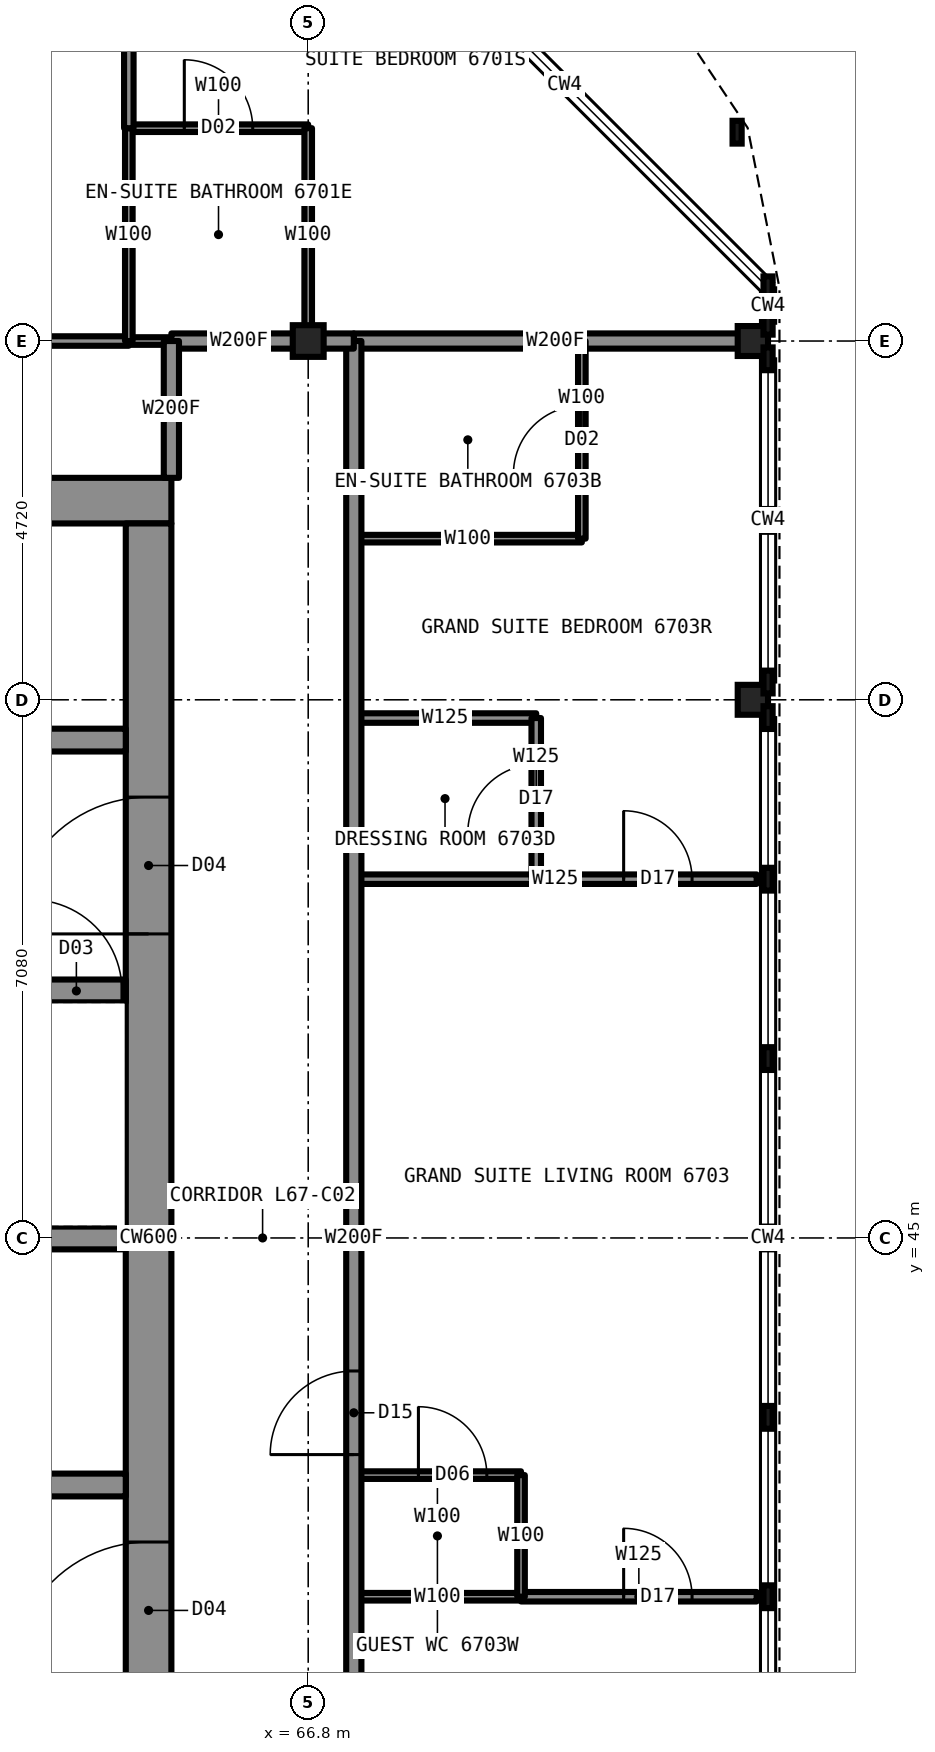
"""IFC4 building model, lengths in metres.
Left out: names, types, materials, properties, quantities, classifications, styles, units other than length and angle.
Written with IfcOpenShell. Run it as: python <this file> out.ifc"""

import sys

from ifc_helpers import new_model, si_unit, direction, frame, frame_2d, origin, origin_2d, place, context, subcontext, project, spatial, rectangle, i_section, extrude, element, fill, save


model = new_model("IFC4")
c1 = context("Model", 3, precision=1e-05, world=origin(), true_north=direction((0.0, 1.0)))
c2 = subcontext(c1, "Body", "Model", "MODEL_VIEW")
j1 = project(units=[si_unit("LENGTHUNIT", "METRE"), si_unit("PLANEANGLEUNIT", "RADIAN")], contexts=[c1])
p1 = place(None, origin())
s1 = spatial("IfcSite", under=j1, at=p1, CompositionType="ELEMENT")
p2 = place(p1, origin())
s2 = spatial("IfcBuilding", under=s1, at=p2, CompositionType="ELEMENT")
p3 = place(p2, frame((0.0, 0.0, 247.7)))
s3 = spatial("IfcBuildingStorey", under=s2, at=p3, CompositionType="ELEMENT", Elevation=247.7)
for number, where, z_axis, x_axis in (
    (1, (72.65, 52.08, 0.0), (0.0, 0.0, 1.0), (1.0, 0.0, 0.0)),
    (2, (72.65, 56.8, 0.0), (0.0, 0.0, 1.0), (1.0, 0.0, 0.0)),
):
    element("IfcColumn", number, at=place(p3, frame(where, z_axis=z_axis, x_axis=x_axis)), inside=s3, PredefinedType="COLUMN", context=c2, shape_type="SweptSolid", body=[
        extrude(i_section(OverallWidth=0.399, OverallDepth=0.394, WebThickness=0.023, FlangeThickness=0.037, at=origin_2d()), origin(), (0.0, 0.0, 1.0), 3.5),
    ])
p4 = place(p3, frame((66.8, 56.8, 0.0), z_axis=(0.0, 0.0, 1.0), x_axis=(1.0, 0.0, 0.0)))
e3 = element("IfcColumn", 3, at=p4, inside=s3, PredefinedType="COLUMN", context=c2, shape_type="SweptSolid", body=[
    extrude(i_section(OverallWidth=0.406, OverallDepth=0.417, WebThickness=0.03, FlangeThickness=0.048, at=origin_2d()), origin(), (0.0, 0.0, 1.0), 3.5),
])
p5 = place(p3, frame((45.0, 54.7, 0.0), z_axis=(0.0, 0.0, 1.0), x_axis=(1.0, 0.0, 0.0)))
e4 = element("IfcWall", 4, at=p5, inside=s3, PredefinedType="SHEAR", context=c2, shape_type="SweptSolid", body=[
    extrude(rectangle(XDim=20.0, YDim=0.6, at=frame_2d((10.0, 0.0))), origin(), (0.0, 0.0, 1.0), 3.5),
])
p6 = place(p3, frame((64.7, 35.6, 0.0), z_axis=(0.0, 0.0, 1.0), x_axis=(0.0, 1.0, 0.0)))
e5 = element("IfcWall", 5, at=p6, inside=s3, PredefinedType="SHEAR", context=c2, shape_type="SweptSolid", body=[
    extrude(rectangle(XDim=18.8, YDim=0.6, at=frame_2d((9.4, 0.0))), origin(), (0.0, 0.0, 1.0), 3.5),
])
p7 = place(p6, frame((13.4, 0.0, 0.0)))
e6 = element("IfcOpeningElement", 6, at=p7, cuts=e5, PredefinedType="OPENING", context=c2, shape_type="SweptSolid", body=[
    extrude(rectangle(XDim=1.8, YDim=2.2, at=frame_2d((0.9, 1.1))), frame((0.0, 0.31, 0.0), z_axis=(0.0, -1.0, 0.0), x_axis=(1.0, 0.0, 0.0)), (0.0, 0.0, 1.0), 0.62),
])
p8 = place(p6, frame((3.6, 0.0, 0.0)))
e7 = element("IfcOpeningElement", 7, at=p8, cuts=e5, PredefinedType="OPENING", context=c2, shape_type="SweptSolid", body=[
    extrude(rectangle(XDim=1.8, YDim=2.2, at=frame_2d((0.9, 1.1))), frame((0.0, 0.31, 0.0), z_axis=(0.0, -1.0, 0.0), x_axis=(1.0, 0.0, 0.0)), (0.0, 0.0, 1.0), 0.62),
])
p9 = place(p3, frame((45.6, 51.55, 0.0), z_axis=(0.0, 0.0, 1.0), x_axis=(1.0, 0.0, 0.0)))
e8 = element("IfcWall", 8, at=p9, inside=s3, PredefinedType="SHEAR", context=c2, shape_type="SweptSolid", body=[
    extrude(rectangle(XDim=18.8, YDim=0.3, at=frame_2d((9.4, 0.0))), origin(), (0.0, 0.0, 1.0), 3.5),
])
p10 = place(p9, frame((4.8, 0.0, 0.0)))
e9 = element("IfcOpeningElement", 9, at=p10, cuts=e8, PredefinedType="OPENING", context=c2, shape_type="SweptSolid", body=[
    extrude(rectangle(XDim=1.0, YDim=2.1, at=frame_2d((0.5, 1.05))), frame((0.0, 0.16, 0.0), z_axis=(0.0, -1.0, 0.0), x_axis=(1.0, 0.0, 0.0)), (0.0, 0.0, 1.0), 0.32),
])
p11 = place(p9, frame((11.6, 0.0, 0.0)))
e10 = element("IfcOpeningElement", 10, at=p11, cuts=e8, PredefinedType="OPENING", context=c2, shape_type="SweptSolid", body=[
    extrude(rectangle(XDim=1.1, YDim=2.2, at=frame_2d((0.55, 1.1))), frame((0.0, 0.16, 0.0), z_axis=(0.0, -1.0, 0.0), x_axis=(1.0, 0.0, 0.0)), (0.0, 0.0, 1.0), 0.32),
])
p12 = place(p9, frame((14.3, 0.0, 0.0)))
e11 = element("IfcOpeningElement", 11, at=p12, cuts=e8, PredefinedType="OPENING", context=c2, shape_type="SweptSolid", body=[
    extrude(rectangle(XDim=1.1, YDim=2.2, at=frame_2d((0.55, 1.1))), frame((0.0, 0.16, 0.0), z_axis=(0.0, -1.0, 0.0), x_axis=(1.0, 0.0, 0.0)), (0.0, 0.0, 1.0), 0.32),
])
p13 = place(p3, frame((56.2, 48.25, 0.0), z_axis=(0.0, 0.0, 1.0), x_axis=(1.0, 0.0, 0.0)))
e12 = element("IfcWall", 12, at=p13, inside=s3, PredefinedType="SHEAR", context=c2, shape_type="SweptSolid", body=[
    extrude(rectangle(XDim=8.2, YDim=0.3, at=frame_2d((4.1, 0.0))), origin(), (0.0, 0.0, 1.0), 3.5),
])
p14 = place(p13, frame((6.95, 0.0, 0.0)))
e13 = element("IfcOpeningElement", 13, at=p14, cuts=e12, PredefinedType="OPENING", context=c2, shape_type="SweptSolid", body=[
    extrude(rectangle(XDim=1.2, YDim=2.2, at=frame_2d((0.6, 1.1))), frame((0.0, 0.16, 0.0), z_axis=(0.0, -1.0, 0.0), x_axis=(1.0, 0.0, 0.0)), (0.0, 0.0, 1.0), 0.32),
])
p15 = place(p3, frame((56.2, 41.75, 0.0), z_axis=(0.0, 0.0, 1.0), x_axis=(1.0, 0.0, 0.0)))
e14 = element("IfcWall", 14, at=p15, inside=s3, PredefinedType="SHEAR", context=c2, shape_type="SweptSolid", body=[
    extrude(rectangle(XDim=8.2, YDim=0.3, at=frame_2d((4.1, 0.0))), origin(), (0.0, 0.0, 1.0), 3.5),
])
p16 = place(p15, frame((3.3, 0.0, 0.0)))
e15 = element("IfcOpeningElement", 15, at=p16, cuts=e14, PredefinedType="OPENING", context=c2, shape_type="SweptSolid", body=[
    extrude(rectangle(XDim=1.0, YDim=2.1, at=frame_2d((0.5, 1.05))), frame((0.0, 0.16, 0.0), z_axis=(0.0, -1.0, 0.0), x_axis=(1.0, 0.0, 0.0)), (0.0, 0.0, 1.0), 0.32),
])
p17 = place(p3, frame((56.5, 45.0, 0.0), z_axis=(0.0, 0.0, 1.0), x_axis=(1.0, 0.0, 0.0)))
e16 = element("IfcWall", 16, at=p17, inside=s3, PredefinedType="SHEAR", context=c2, shape_type="SweptSolid", body=[
    extrude(rectangle(XDim=7.9, YDim=0.3, at=frame_2d((3.95, 0.0))), origin(), (0.0, 0.0, 1.0), 3.5),
])
p18 = place(p3, frame((67.4, 41.88, 0.0), z_axis=(0.0, 0.0, 1.0), x_axis=(1.0, 0.0, 0.0)))
e17 = element("IfcWall", 17, at=p18, inside=s3, PredefinedType="PARTITIONING", context=c2, shape_type="SweptSolid", body=[
    extrude(rectangle(XDim=2.2, YDim=0.1, at=frame_2d((1.1, 0.0))), origin(), (0.0, 0.0, 1.0), 3.33),
])
p19 = place(p18, frame((0.85, 0.0, 0.0)))
e18 = element("IfcOpeningElement", 18, at=p19, cuts=e17, PredefinedType="OPENING", context=c2, shape_type="SweptSolid", body=[
    extrude(rectangle(XDim=0.9, YDim=2.1, at=frame_2d((0.45, 1.05))), frame((0.0, 0.06, 0.0), z_axis=(0.0, -1.0, 0.0), x_axis=(1.0, 0.0, 0.0)), (0.0, 0.0, 1.0), 0.12),
])
p20 = place(p3, frame((67.4, 40.28, 0.0), z_axis=(0.0, 0.0, 1.0), x_axis=(1.0, 0.0, 0.0)))
e19 = element("IfcWall", 19, at=p20, inside=s3, PredefinedType="PARTITIONING", context=c2, shape_type="SweptSolid", body=[
    extrude(rectangle(XDim=2.2, YDim=0.1, at=frame_2d((1.1, 0.0))), origin(), (0.0, 0.0, 1.0), 2.797),
])
p21 = place(p3, frame((69.6, 40.28, 0.0), z_axis=(0.0, 0.0, 1.0), x_axis=(1.0, 0.0, 0.0)))
e20 = element("IfcWall", 20, at=p21, inside=s3, PredefinedType="PARTITIONING", context=c2, shape_type="SweptSolid", body=[
    extrude(rectangle(XDim=3.1, YDim=0.125, at=frame_2d((1.55, 0.0))), origin(), (0.0, 0.0, 1.0), 2.797),
])
p22 = place(p21, frame((1.35, 0.0, 0.0)))
e21 = element("IfcOpeningElement", 21, at=p22, cuts=e20, PredefinedType="OPENING", context=c2, shape_type="SweptSolid", body=[
    extrude(rectangle(XDim=0.9, YDim=2.2, at=frame_2d((0.45, 1.1))), frame((0.0, 0.073, 0.0), z_axis=(0.0, -1.0, 0.0), x_axis=(1.0, 0.0, 0.0)), (0.0, 0.0, 1.0), 0.145),
])
p23 = place(p3, frame((64.44, 56.8, 0.0), z_axis=(0.0, 0.0, 1.0), x_axis=(1.0, 0.0, 0.0)))
e22 = element("IfcWall", 22, at=p23, inside=s3, PredefinedType="PARTITIONING", context=c2, shape_type="SweptSolid", body=[
    extrude(rectangle(XDim=0.56, YDim=0.1, at=frame_2d((0.28, 0.0))), origin(), (0.0, 0.0, 1.0), 3.33),
])
p24 = place(p3, frame((65.0, 56.8, 0.0), z_axis=(0.0, 0.0, 1.0), x_axis=(1.0, 0.0, 0.0)))
e23 = element("IfcWall", 23, at=p24, inside=s3, PredefinedType="PARTITIONING", context=c2, shape_type="SweptSolid", body=[
    extrude(rectangle(XDim=1.78, YDim=0.2, at=frame_2d((0.89, 0.0))), origin(), (0.0, 0.0, 1.0), 3.33),
])
p25 = place(p3, frame((67.4, 56.8, 0.0), z_axis=(0.0, 0.0, 1.0), x_axis=(1.0, 0.0, 0.0)))
e24 = element("IfcWall", 24, at=p25, inside=s3, PredefinedType="PARTITIONING", context=c2, shape_type="SweptSolid", body=[
    extrude(rectangle(XDim=5.3, YDim=0.2, at=frame_2d((2.65, 0.0))), origin(), (0.0, 0.0, 1.0), 2.573),
])
p26 = place(p3, frame((57.36, 56.8, 0.0), z_axis=(0.0, 0.0, 1.0), x_axis=(1.0, 0.0, 0.0)))
e25 = element("IfcWall", 25, at=p26, inside=s3, PredefinedType="PARTITIONING", context=c2, shape_type="SweptSolid", body=[
    extrude(rectangle(XDim=7.08, YDim=0.125, at=frame_2d((3.54, 0.0))), origin(), (0.0, 0.0, 1.0), 3.33),
])
p27 = place(p3, frame((64.44, 59.6, 0.0), z_axis=(0.0, 0.0, 1.0), x_axis=(1.0, 0.0, 0.0)))
e26 = element("IfcWall", 26, at=p27, inside=s3, PredefinedType="PARTITIONING", context=c2, shape_type="SweptSolid", body=[
    extrude(rectangle(XDim=2.36, YDim=0.1, at=frame_2d((1.18, 0.0))), origin(), (0.0, 0.0, 1.0), 3.33),
])
p28 = place(p27, frame((0.73, 0.0, 0.0)))
e27 = element("IfcOpeningElement", 27, at=p28, cuts=e26, PredefinedType="OPENING", context=c2, shape_type="SweptSolid", body=[
    extrude(rectangle(XDim=0.9, YDim=2.1, at=frame_2d((0.45, 1.05))), frame((0.0, 0.06, 0.0), z_axis=(0.0, -1.0, 0.0), x_axis=(1.0, 0.0, 0.0)), (0.0, 0.0, 1.0), 0.12),
])
p29 = place(p3, frame((67.4, 49.72, 0.0), z_axis=(0.0, 0.0, 1.0), x_axis=(1.0, 0.0, 0.0)))
e28 = element("IfcWall", 28, at=p29, inside=s3, PredefinedType="PARTITIONING", context=c2, shape_type="SweptSolid", body=[
    extrude(rectangle(XDim=5.3, YDim=0.125, at=frame_2d((2.65, 0.0))), origin(), (0.0, 0.0, 1.0), 2.797),
])
p30 = place(p29, frame((3.55, 0.0, 0.0)))
e29 = element("IfcOpeningElement", 29, at=p30, cuts=e28, PredefinedType="OPENING", context=c2, shape_type="SweptSolid", body=[
    extrude(rectangle(XDim=0.9, YDim=2.2, at=frame_2d((0.45, 1.1))), frame((0.0, 0.073, 0.0), z_axis=(0.0, -1.0, 0.0), x_axis=(1.0, 0.0, 0.0)), (0.0, 0.0, 1.0), 0.145),
])
p31 = place(p3, frame((67.4, 51.84, 0.0), z_axis=(0.0, 0.0, 1.0), x_axis=(1.0, 0.0, 0.0)))
e30 = element("IfcWall", 30, at=p31, inside=s3, PredefinedType="PARTITIONING", context=c2, shape_type="SweptSolid", body=[
    extrude(rectangle(XDim=2.4, YDim=0.125, at=frame_2d((1.2, 0.0))), origin(), (0.0, 0.0, 1.0), 3.33),
])
p32 = place(p3, frame((67.4, 54.2, 0.0), z_axis=(0.0, 0.0, 1.0), x_axis=(1.0, 0.0, 0.0)))
e31 = element("IfcWall", 31, at=p32, inside=s3, PredefinedType="PARTITIONING", context=c2, shape_type="SweptSolid", body=[
    extrude(rectangle(XDim=3.0, YDim=0.1, at=frame_2d((1.5, 0.0))), origin(), (0.0, 0.0, 1.0), 3.33),
])
p33 = place(p3, frame((65.0, 55.0, 0.0), z_axis=(0.0, 0.0, 1.0), x_axis=(0.0, 1.0, 0.0)))
e32 = element("IfcWall", 32, at=p33, inside=s3, PredefinedType="PARTITIONING", context=c2, shape_type="SweptSolid", body=[
    extrude(rectangle(XDim=1.8, YDim=0.2, at=frame_2d((0.9, 0.0))), origin(), (0.0, 0.0, 1.0), 3.33),
])
p34 = place(p3, frame((66.8, 56.8, 0.0), z_axis=(0.0, 0.0, 1.0), x_axis=(0.0, 1.0, 0.0)))
e33 = element("IfcWall", 33, at=p34, inside=s3, PredefinedType="PARTITIONING", context=c2, shape_type="SweptSolid", body=[
    extrude(rectangle(XDim=2.8, YDim=0.1, at=frame_2d((1.4, 0.0))), origin(), (0.0, 0.0, 1.0), 2.573),
])
p35 = place(p3, frame((67.4, 33.2, 0.0), z_axis=(0.0, 0.0, 1.0), x_axis=(0.0, 1.0, 0.0)))
e34 = element("IfcWall", 34, at=p35, inside=s3, PredefinedType="PARTITIONING", context=c2, shape_type="SweptSolid", body=[
    extrude(rectangle(XDim=23.6, YDim=0.2, at=frame_2d((11.8, 0.0))), origin(), (0.0, 0.0, 1.0), 3.33),
])
p36 = place(p35, frame((8.95, 0.0, 0.0)))
e35 = element("IfcOpeningElement", 35, at=p36, cuts=e34, PredefinedType="OPENING", context=c2, shape_type="SweptSolid", body=[
    extrude(rectangle(XDim=1.1, YDim=2.2, at=frame_2d((0.55, 1.1))), frame((0.0, 0.11, 0.0), z_axis=(0.0, -1.0, 0.0), x_axis=(1.0, 0.0, 0.0)), (0.0, 0.0, 1.0), 0.22),
])
p37 = place(p35, frame((0.7, 0.0, 0.0)))
e36 = element("IfcOpeningElement", 36, at=p37, cuts=e34, PredefinedType="OPENING", context=c2, shape_type="SweptSolid", body=[
    extrude(rectangle(XDim=1.0, YDim=2.1, at=frame_2d((0.5, 1.05))), frame((0.0, 0.11, 0.0), z_axis=(0.0, -1.0, 0.0), x_axis=(1.0, 0.0, 0.0)), (0.0, 0.0, 1.0), 0.22),
])
p38 = place(p3, frame((69.6, 40.28, 0.0), z_axis=(0.0, 0.0, 1.0), x_axis=(0.0, 1.0, 0.0)))
e37 = element("IfcWall", 37, at=p38, inside=s3, PredefinedType="PARTITIONING", context=c2, shape_type="SweptSolid", body=[
    extrude(rectangle(XDim=1.6, YDim=0.1, at=frame_2d((0.8, 0.0))), origin(), (0.0, 0.0, 1.0), 3.33),
])
p39 = place(p3, frame((69.8, 49.72, 0.0), z_axis=(0.0, 0.0, 1.0), x_axis=(0.0, 1.0, 0.0)))
e38 = element("IfcWall", 38, at=p39, inside=s3, PredefinedType="PARTITIONING", context=c2, shape_type="SweptSolid", body=[
    extrude(rectangle(XDim=2.12, YDim=0.125, at=frame_2d((1.06, 0.0))), origin(), (0.0, 0.0, 1.0), 3.33),
])
p40 = place(p39, frame((0.61, 0.0, 0.0)))
e39 = element("IfcOpeningElement", 39, at=p40, cuts=e38, PredefinedType="OPENING", context=c2, shape_type="SweptSolid", body=[
    extrude(rectangle(XDim=0.9, YDim=2.2, at=frame_2d((0.45, 1.1))), frame((0.0, 0.073, 0.0), z_axis=(0.0, -1.0, 0.0), x_axis=(1.0, 0.0, 0.0)), (0.0, 0.0, 1.0), 0.145),
])
p41 = place(p3, frame((70.4, 54.2, 0.0), z_axis=(0.0, 0.0, 1.0), x_axis=(0.0, 1.0, 0.0)))
e40 = element("IfcWall", 40, at=p41, inside=s3, PredefinedType="PARTITIONING", context=c2, shape_type="SweptSolid", body=[
    extrude(rectangle(XDim=2.6, YDim=0.1, at=frame_2d((1.3, 0.0))), origin(), (0.0, 0.0, 1.0), 3.33),
])
p42 = place(p41, frame((0.85, 0.0, 0.0)))
e41 = element("IfcOpeningElement", 41, at=p42, cuts=e40, PredefinedType="OPENING", context=c2, shape_type="SweptSolid", body=[
    extrude(rectangle(XDim=0.9, YDim=2.1, at=frame_2d((0.45, 1.05))), frame((0.0, 0.06, 0.0), z_axis=(0.0, -1.0, 0.0), x_axis=(1.0, 0.0, 0.0)), (0.0, 0.0, 1.0), 0.12),
])
p43 = place(p3, frame((64.44, 56.8, 0.0), z_axis=(0.0, 0.0, 1.0), x_axis=(0.0, 1.0, 0.0)))
e42 = element("IfcWall", 42, at=p43, inside=s3, PredefinedType="PARTITIONING", context=c2, shape_type="SweptSolid", body=[
    extrude(rectangle(XDim=2.8, YDim=0.1, at=frame_2d((1.4, 0.0))), origin(), (0.0, 0.0, 1.0), 3.33),
])
p44 = place(p3, frame((64.44, 59.6, 0.0), z_axis=(0.0, 0.0, 1.0), x_axis=(0.0, 1.0, 0.0)))
e43 = element("IfcWall", 43, at=p44, inside=s3, PredefinedType="PARTITIONING", context=c2, shape_type="SweptSolid", body=[
    extrude(rectangle(XDim=3.1, YDim=0.125, at=frame_2d((1.55, 0.0))), origin(), (0.0, 0.0, 1.0), 3.33),
])
p45 = place(p44, frame((1.25, 0.0, 0.0)))
e44 = element("IfcOpeningElement", 44, at=p45, cuts=e43, PredefinedType="OPENING", context=c2, shape_type="SweptSolid", body=[
    extrude(rectangle(XDim=0.9, YDim=2.2, at=frame_2d((0.45, 1.1))), frame((0.0, 0.073, 0.0), z_axis=(0.0, -1.0, 0.0), x_axis=(1.0, 0.0, 0.0)), (0.0, 0.0, 1.0), 0.145),
])
p46 = place(p3, frame((66.78, 56.8, 0.0), z_axis=(0.0, 0.0, 1.0), x_axis=(1.0, 0.0, 0.0)))
e45 = element("IfcWall", 45, at=p46, inside=s3, PredefinedType="PARTITIONING", context=c2, shape_type="SweptSolid", body=[
    extrude(rectangle(XDim=0.62, YDim=0.2, at=frame_2d((0.31, 0.0))), origin(), (0.0, 0.0, 1.0), 2.573),
])
p47 = place(p28, origin())
e46 = element("IfcDoor", 46, at=p47, inside=s3, OperationType="SINGLE_SWING_RIGHT", PredefinedType="DOOR", context=c2, shape_type="SweptSolid", body=[
    extrude(rectangle(XDim=0.9, YDim=2.1, at=frame_2d((0.45, 1.05))), frame((0.0, 0.025, 0.0), z_axis=(0.0, -1.0, 0.0), x_axis=(1.0, 0.0, 0.0)), (0.0, 0.0, 1.0), 0.05),
])
fill(e27, e46)
p48 = place(p36, origin())
e47 = element("IfcDoor", 47, at=p48, inside=s3, OperationType="SINGLE_SWING_LEFT", PredefinedType="DOOR", context=c2, shape_type="SweptSolid", body=[
    extrude(rectangle(XDim=1.1, YDim=2.2, at=frame_2d((0.55, 1.1))), frame((0.0, 0.025, 0.0), z_axis=(0.0, -1.0, 0.0), x_axis=(1.0, 0.0, 0.0)), (0.0, 0.0, 1.0), 0.05),
])
fill(e35, e47)
p49 = place(p42, origin())
e48 = element("IfcDoor", 48, at=p49, inside=s3, OperationType="SINGLE_SWING_RIGHT", PredefinedType="DOOR", context=c2, shape_type="SweptSolid", body=[
    extrude(rectangle(XDim=0.9, YDim=2.1, at=frame_2d((0.45, 1.05))), frame((0.0, 0.025, 0.0), z_axis=(0.0, -1.0, 0.0), x_axis=(1.0, 0.0, 0.0)), (0.0, 0.0, 1.0), 0.05),
])
fill(e41, e48)
p50 = place(p40, origin())
e49 = element("IfcDoor", 49, at=p50, inside=s3, OperationType="SINGLE_SWING_LEFT", PredefinedType="DOOR", context=c2, shape_type="SweptSolid", body=[
    extrude(rectangle(XDim=0.9, YDim=2.2, at=frame_2d((0.45, 1.1))), frame((0.0, 0.025, 0.0), z_axis=(0.0, -1.0, 0.0), x_axis=(1.0, 0.0, 0.0)), (0.0, 0.0, 1.0), 0.05),
])
fill(e39, e49)
p51 = place(p22, origin())
e50 = element("IfcDoor", 50, at=p51, inside=s3, OperationType="SINGLE_SWING_LEFT", PredefinedType="DOOR", context=c2, shape_type="SweptSolid", body=[
    extrude(rectangle(XDim=0.9, YDim=2.2, at=frame_2d((0.45, 1.1))), frame((0.0, 0.025, 0.0), z_axis=(0.0, -1.0, 0.0), x_axis=(1.0, 0.0, 0.0)), (0.0, 0.0, 1.0), 0.05),
])
fill(e21, e50)
p52 = place(p30, origin())
e51 = element("IfcDoor", 51, at=p52, inside=s3, OperationType="SINGLE_SWING_LEFT", PredefinedType="DOOR", context=c2, shape_type="SweptSolid", body=[
    extrude(rectangle(XDim=0.9, YDim=2.2, at=frame_2d((0.45, 1.1))), frame((0.0, 0.025, 0.0), z_axis=(0.0, -1.0, 0.0), x_axis=(1.0, 0.0, 0.0)), (0.0, 0.0, 1.0), 0.05),
])
fill(e29, e51)
p53 = place(p19, origin())
e52 = element("IfcDoor", 52, at=p53, inside=s3, OperationType="SINGLE_SWING_LEFT", PredefinedType="DOOR", context=c2, shape_type="SweptSolid", body=[
    extrude(rectangle(XDim=0.9, YDim=2.1, at=frame_2d((0.45, 1.05))), frame((0.0, 0.025, 0.0), z_axis=(0.0, -1.0, 0.0), x_axis=(1.0, 0.0, 0.0)), (0.0, 0.0, 1.0), 0.05),
])
fill(e18, e52)
p54 = place(p7, origin())
e53 = element("IfcDoor", 53, at=p54, inside=s3, OperationType="DOUBLE_DOOR_SINGLE_SWING", PredefinedType="DOOR", context=c2, shape_type="SweptSolid", body=[
    extrude(rectangle(XDim=1.8, YDim=2.2, at=frame_2d((0.9, 1.1))), frame((0.0, 0.025, 0.0), z_axis=(0.0, -1.0, 0.0), x_axis=(1.0, 0.0, 0.0)), (0.0, 0.0, 1.0), 0.05),
])
fill(e6, e53)
p55 = place(p8, origin())
e54 = element("IfcDoor", 54, at=p55, inside=s3, OperationType="DOUBLE_DOOR_SINGLE_SWING", PredefinedType="DOOR", context=c2, shape_type="SweptSolid", body=[
    extrude(rectangle(XDim=1.8, YDim=2.2, at=frame_2d((0.9, 1.1))), frame((0.0, 0.025, 0.0), z_axis=(0.0, -1.0, 0.0), x_axis=(1.0, 0.0, 0.0)), (0.0, 0.0, 1.0), 0.05),
])
fill(e7, e54)
p56 = place(p14, origin())
e55 = element("IfcDoor", 55, at=p56, inside=s3, OperationType="SINGLE_SWING_LEFT", PredefinedType="DOOR", context=c2, shape_type="SweptSolid", body=[
    extrude(rectangle(XDim=1.2, YDim=2.2, at=frame_2d((0.6, 1.1))), frame((0.0, 0.025, 0.0), z_axis=(0.0, -1.0, 0.0), x_axis=(1.0, 0.0, 0.0)), (0.0, 0.0, 1.0), 0.05),
])
fill(e13, e55)
save(model, sys.argv[1])
